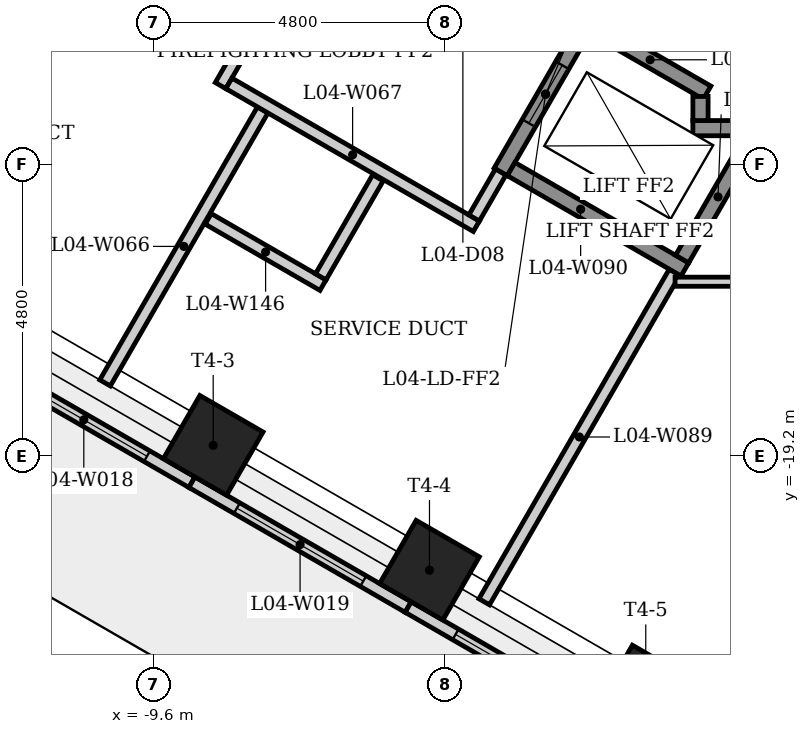
"""IFC4 building model, lengths in metres.
Left out: names, types, materials, properties, quantities, classifications, styles, units other than length and angle.
Written with IfcOpenShell. Run it as: python <this file> out.ifc"""

import sys

from ifc_helpers import new_model, si_unit, direction, frame, frame_2d, origin, origin_2d, place, context, subcontext, project, spatial, rectangle, extrude, element, fill, save


model = new_model("IFC4")
c1 = context("Model", 3, precision=1e-05, world=origin(), true_north=direction((0.0, 1.0)))
c2 = subcontext(c1, "Body", "Model", "MODEL_VIEW")
j1 = project(units=[si_unit("LENGTHUNIT", "METRE"), si_unit("PLANEANGLEUNIT", "RADIAN")], contexts=[c1])
p1 = place(None, origin())
s1 = spatial("IfcSite", under=j1, at=p1, CompositionType="ELEMENT")
p2 = place(p1, origin())
s2 = spatial("IfcBuilding", under=s1, at=p2, CompositionType="ELEMENT")
p3 = place(p2, frame((0.0, 0.0, 20.5)))
s3 = spatial("IfcBuildingStorey", under=s2, at=p3, CompositionType="ELEMENT", Elevation=20.5)
for number, where, z_axis, x_axis in (
    (1, (-8.614, -19.027, 0.0), (0.0, 0.0, 1.0), (-0.5, -0.866, 0.0)),
    (2, (-5.057, -21.08, 0.0), (0.0, 0.0, 1.0), (-0.5, -0.866, 0.0)),
    (3, (-1.5, -23.134, 0.0), (0.0, 0.0, 1.0), (-0.5, -0.866, 0.0)),
):
    element("IfcColumn", number, at=place(p3, frame(where, z_axis=z_axis, x_axis=x_axis)), inside=s3, PredefinedType="COLUMN", context=c2, shape_type="SweptSolid", body=[
        extrude(rectangle(XDim=1.2, YDim=1.2, at=origin_2d()), origin(), (0.0, 0.0, 1.0), 5.0),
    ])
p4 = place(p3, frame((-12.52, -17.58, 0.0), z_axis=(0.0, 0.0, 1.0), x_axis=(0.866021252249, -0.500007190601, 0.0)))
e4 = element("IfcWall", 4, at=p4, inside=s3, PredefinedType="SOLIDWALL", context=c2, shape_type="SweptSolid", body=[
    extrude(rectangle(XDim=4.107, YDim=0.2, at=frame_2d((2.053, 0.0))), origin(), (0.0, 0.0, 1.0), 4.88),
])
p5 = place(p4, frame((0.854, 0.0, 0.8)))
e5 = element("IfcOpeningElement", 5, at=p5, cuts=e4, PredefinedType="OPENING", context=c2, shape_type="SweptSolid", body=[
    extrude(rectangle(XDim=2.4, YDim=2.4, at=frame_2d((1.2, 1.2))), frame((0.0, 0.11, 0.0), z_axis=(0.0, -1.0, 0.0), x_axis=(1.0, 0.0, 0.0)), (0.0, 0.0, 1.0), 0.22),
])
p6 = place(p3, frame((-8.964, -19.633, 0.0), z_axis=(0.0, 0.0, 1.0), x_axis=(0.866010373586, -0.500026032164, 0.0)))
e6 = element("IfcWall", 6, at=p6, inside=s3, PredefinedType="SOLIDWALL", context=c2, shape_type="SweptSolid", body=[
    extrude(rectangle(XDim=4.107, YDim=0.2, at=frame_2d((2.054, 0.0))), origin(), (0.0, 0.0, 1.0), 4.88),
])
p7 = place(p6, frame((0.854, 0.0, 0.8)))
e7 = element("IfcOpeningElement", 7, at=p7, cuts=e6, PredefinedType="OPENING", context=c2, shape_type="SweptSolid", body=[
    extrude(rectangle(XDim=2.4, YDim=2.4, at=frame_2d((1.2, 1.2))), frame((0.0, 0.11, 0.0), z_axis=(0.0, -1.0, 0.0), x_axis=(1.0, 0.0, 0.0)), (0.0, 0.0, 1.0), 0.22),
])
p8 = place(p3, frame((-5.407, -21.687, 0.0), z_axis=(0.0, 0.0, 1.0), x_axis=(0.866016145416, -0.500016035621, 0.0)))
e8 = element("IfcWall", 8, at=p8, inside=s3, PredefinedType="SOLIDWALL", context=c2, shape_type="SweptSolid", body=[
    extrude(rectangle(XDim=4.199, YDim=0.2, at=frame_2d((2.1, 0.0))), origin(), (0.0, 0.0, 1.0), 4.88),
])
p9 = place(p8, frame((0.9, 0.0, 0.8)))
e9 = element("IfcOpeningElement", 9, at=p9, cuts=e8, PredefinedType="OPENING", context=c2, shape_type="SweptSolid", body=[
    extrude(rectangle(XDim=2.4, YDim=2.4, at=frame_2d((1.2, 1.2))), frame((0.0, 0.11, 0.0), z_axis=(0.0, -1.0, 0.0), x_axis=(1.0, 0.0, 0.0)), (0.0, 0.0, 1.0), 0.22),
])
p10 = place(p3, frame((-8.493, -13.11, 0.0), z_axis=(0.0, 0.0, 1.0), x_axis=(0.500067724834, 0.865986299303, 0.0)))
e10 = element("IfcWall", 10, at=p10, inside=s3, PredefinedType="PLUMBINGWALL", context=c2, shape_type="SweptSolid", body=[
    extrude(rectangle(XDim=0.775, YDim=0.2, at=frame_2d((0.388, 0.0))), origin(), (0.0, 0.0, 1.0), 4.65),
])
p11 = place(p3, frame((-7.8, -13.51, 0.0), z_axis=(0.0, 0.0, 1.0), x_axis=(-0.499998276493, -0.866026398849, 0.0)))
e11 = element("IfcWall", 11, at=p11, inside=s3, PredefinedType="PLUMBINGWALL", context=c2, shape_type="SweptSolid", body=[
    extrude(rectangle(XDim=5.185, YDim=0.2, at=frame_2d((2.592, 0.0))), origin(), (0.0, 0.0, 1.0), 4.65),
])
p12 = place(p3, frame((-8.356, -13.073, 0.0), z_axis=(0.0, 0.0, 1.0), x_axis=(0.866038532462, -0.499977259774, 0.0)))
e12 = element("IfcWall", 12, at=p12, inside=s3, PredefinedType="PLUMBINGWALL", context=c2, shape_type="SweptSolid", body=[
    extrude(rectangle(XDim=4.7, YDim=0.2, at=frame_2d((2.35, 0.0))), origin(), (0.0, 0.0, 1.0), 4.65),
])
p13 = place(p3, frame((-3.885, -14.529, 0.0), z_axis=(0.0, 0.0, 1.0), x_axis=(-0.499859285417, -0.866106630146, 0.0)))
e13 = element("IfcWall", 13, at=p13, inside=s3, PredefinedType="PLUMBINGWALL", context=c2, shape_type="SweptSolid", body=[
    extrude(rectangle(XDim=0.875, YDim=0.2, at=frame_2d((0.438, 0.0))), origin(), (0.0, 0.0, 1.0), 4.65),
])
p14 = place(p3, frame((-2.41, -11.974, 0.0), z_axis=(0.0, 0.0, 1.0), x_axis=(-0.500001826776, -0.866024349092, 0.0)))
e14 = element("IfcWall", 14, at=p14, inside=s3, PredefinedType="SHEAR", context=c2, shape_type="SweptSolid", body=[
    extrude(rectangle(XDim=2.95, YDim=0.25, at=frame_2d((1.475, 0.0))), origin(), (0.0, 0.0, 1.0), 4.65),
])
p15 = place(p14, frame((0.925, 0.0, 0.0)))
e15 = element("IfcOpeningElement", 15, at=p15, cuts=e14, PredefinedType="OPENING", context=c2, shape_type="SweptSolid", body=[
    extrude(rectangle(XDim=1.1, YDim=2.1, at=frame_2d((0.55, 1.05))), frame((0.0, 0.135, 0.0), z_axis=(0.0, -1.0, 0.0), x_axis=(1.0, 0.0, 0.0)), (0.0, 0.0, 1.0), 0.27),
])
p16 = place(p3, frame((-2.364, -12.145, 0.0), z_axis=(0.0, 0.0, 1.0), x_axis=(0.86603892542, -0.499976579108, 0.0)))
e16 = element("IfcWall", 16, at=p16, inside=s3, PredefinedType="SHEAR", context=c2, shape_type="SweptSolid", body=[
    extrude(rectangle(XDim=2.162, YDim=0.25, at=frame_2d((1.081, 0.0))), origin(), (0.0, 0.0, 1.0), 4.65),
])
p17 = place(p3, frame((-4.157, -21.6, 0.0), z_axis=(0.0, 0.0, 1.0), x_axis=(0.499998165157, 0.866026463129, 0.0)))
e17 = element("IfcWall", 17, at=p17, inside=s3, PredefinedType="PLUMBINGWALL", context=c2, shape_type="SweptSolid", body=[
    extrude(rectangle(XDim=6.26, YDim=0.2, at=frame_2d((3.13, 0.0))), origin(), (0.0, 0.0, 1.0), 4.65),
])
p18 = place(p3, frame((-0.856, -16.133, 0.0), z_axis=(0.0, 0.0, 1.0), x_axis=(-0.866021716278, 0.500006386895, 0.0)))
e18 = element("IfcWall", 18, at=p18, inside=s3, PredefinedType="SHEAR", context=c2, shape_type="SweptSolid", body=[
    extrude(rectangle(XDim=3.3, YDim=0.25, at=frame_2d((1.65, 0.0))), origin(), (0.0, 0.0, 1.0), 4.65),
])
p19 = place(p3, frame((-0.725, -13.81, 0.0), z_axis=(0.0, 0.0, 1.0), x_axis=(1.0, 0.0, 0.0)))
e19 = element("IfcWall", 19, at=p19, inside=s3, PredefinedType="SHEAR", context=c2, shape_type="SweptSolid", body=[
    extrude(rectangle(XDim=1.191, YDim=0.25, at=frame_2d((0.595, 0.0))), origin(), (0.0, 0.0, 1.0), 4.65),
])
p20 = place(p3, frame((-0.6, -13.289, 0.0), z_axis=(0.0, 0.0, 1.0), x_axis=(0.0, -1.0, 0.0)))
e20 = element("IfcWall", 20, at=p20, inside=s3, PredefinedType="SHEAR", context=c2, shape_type="SweptSolid", body=[
    extrude(rectangle(XDim=0.396, YDim=0.25, at=frame_2d((0.198, 0.0))), origin(), (0.0, 0.0, 1.0), 5.0),
])
p21 = place(p3, frame((0.278, -13.918, 0.0), z_axis=(0.0, 0.0, 1.0), x_axis=(-0.49998806882, -0.866032292145, 0.0)))
e21 = element("IfcWall", 21, at=p21, inside=s3, PredefinedType="SHEAR", context=c2, shape_type="SweptSolid", body=[
    extrude(rectangle(XDim=2.36, YDim=0.25, at=frame_2d((1.18, 0.0))), origin(), (0.0, 0.0, 1.0), 5.0),
])
p22 = place(p3, frame((3.789, -16.336, 0.0), z_axis=(0.0, 0.0, 1.0), x_axis=(-1.0, 0.0, 0.0)))
e22 = element("IfcWall", 22, at=p22, inside=s3, PredefinedType="PARTITIONING", context=c2, shape_type="SweptSolid", body=[
    extrude(rectangle(XDim=4.807, YDim=0.15, at=frame_2d((2.403, 0.0))), origin(), (0.0, 0.0, 1.0), 4.65),
])
p23 = place(p22, frame((1.903, 0.0, 0.0)))
e23 = element("IfcOpeningElement", 23, at=p23, cuts=e22, PredefinedType="OPENING", context=c2, shape_type="SweptSolid", body=[
    extrude(rectangle(XDim=1.0, YDim=2.1, at=frame_2d((0.5, 1.05))), frame((0.0, 0.085, 0.0), z_axis=(0.0, -1.0, 0.0), x_axis=(1.0, 0.0, 0.0)), (0.0, 0.0, 1.0), 0.17),
])
p24 = place(p3, frame((-6.808, -16.392, 0.0), z_axis=(0.0, 0.0, 1.0), x_axis=(-0.866008413041, 0.500029427677, 0.0)))
e24 = element("IfcWall", 24, at=p24, inside=s3, PredefinedType="PLUMBINGWALL", context=c2, shape_type="SweptSolid", body=[
    extrude(rectangle(XDim=2.18, YDim=0.2, at=frame_2d((1.09, 0.0))), origin(), (0.0, 0.0, 1.0), 4.65),
])
p25 = place(p3, frame((-5.905, -14.627, 0.0), z_axis=(0.0, 0.0, 1.0), x_axis=(-0.499966013754, -0.866045024864, 0.0)))
e25 = element("IfcWall", 25, at=p25, inside=s3, PredefinedType="PLUMBINGWALL", context=c2, shape_type="SweptSolid", body=[
    extrude(rectangle(XDim=1.88, YDim=0.2, at=frame_2d((0.94, 0.0))), origin(), (0.0, 0.0, 1.0), 4.65),
])
p26 = place(p5, origin())
e26 = element("IfcWindow", 26, at=p26, inside=s3, PartitioningType="SINGLE_PANEL", PredefinedType="WINDOW", context=c2, shape_type="SweptSolid", body=[
    extrude(rectangle(XDim=2.4, YDim=2.4, at=frame_2d((1.2, 1.2))), frame((0.0, 0.03, 0.0), z_axis=(0.0, -1.0, 0.0), x_axis=(1.0, 0.0, 0.0)), (0.0, 0.0, 1.0), 0.06),
])
fill(e5, e26)
p27 = place(p7, origin())
e27 = element("IfcWindow", 27, at=p27, inside=s3, PartitioningType="SINGLE_PANEL", PredefinedType="WINDOW", context=c2, shape_type="SweptSolid", body=[
    extrude(rectangle(XDim=2.4, YDim=2.4, at=frame_2d((1.2, 1.2))), frame((0.0, 0.03, 0.0), z_axis=(0.0, -1.0, 0.0), x_axis=(1.0, 0.0, 0.0)), (0.0, 0.0, 1.0), 0.06),
])
fill(e7, e27)
p28 = place(p9, origin())
e28 = element("IfcWindow", 28, at=p28, inside=s3, PartitioningType="SINGLE_PANEL", PredefinedType="WINDOW", context=c2, shape_type="SweptSolid", body=[
    extrude(rectangle(XDim=2.4, YDim=2.4, at=frame_2d((1.2, 1.2))), frame((0.0, 0.03, 0.0), z_axis=(0.0, -1.0, 0.0), x_axis=(1.0, 0.0, 0.0)), (0.0, 0.0, 1.0), 0.06),
])
fill(e9, e28)
p29 = place(p15, origin())
e29 = element("IfcDoor", 29, at=p29, inside=s3, OperationType="SLIDING_TO_LEFT", PredefinedType="DOOR", context=c2, shape_type="SweptSolid", body=[
    extrude(rectangle(XDim=1.1, YDim=2.1, at=frame_2d((0.55, 1.05))), frame((0.0, 0.025, 0.0), z_axis=(0.0, -1.0, 0.0), x_axis=(1.0, 0.0, 0.0)), (0.0, 0.0, 1.0), 0.05),
])
fill(e15, e29)
save(model, sys.argv[1])
